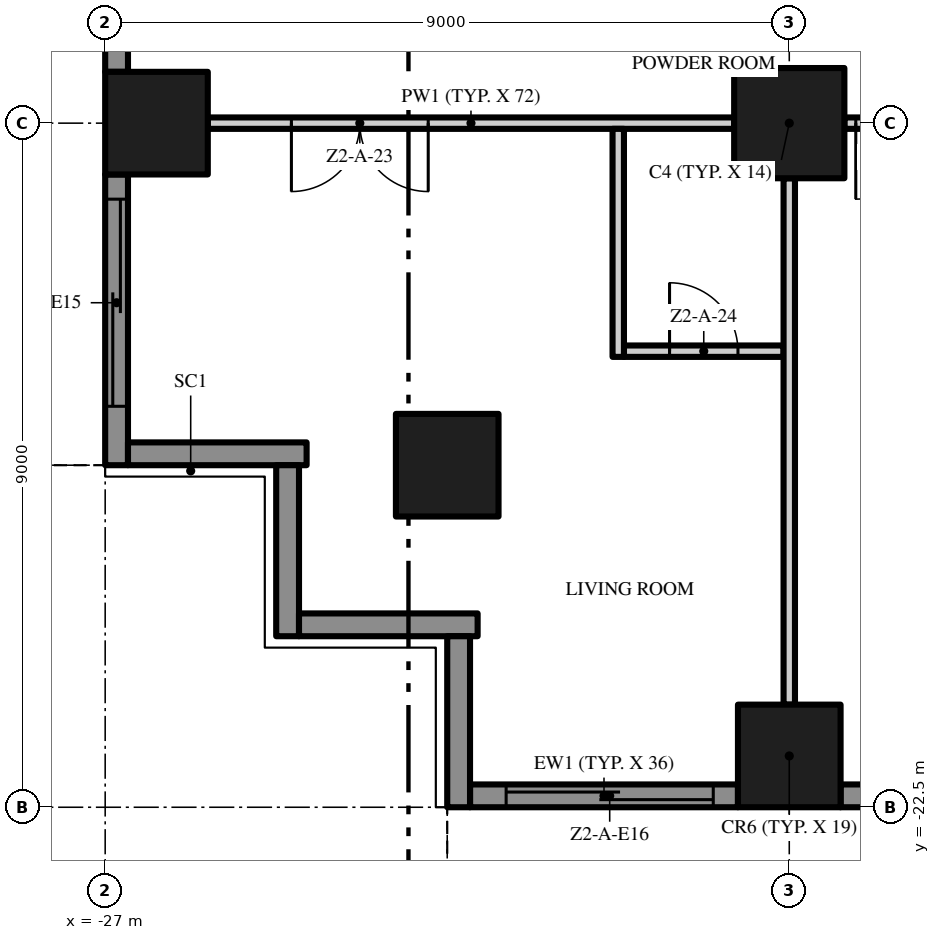
"""IFC4 building model, lengths in metres.
Left out: names, types, materials, properties, quantities, classifications, styles, units other than length and angle.
Written with IfcOpenShell. Run it as: python <this file> out.ifc"""

import sys

from ifc_helpers import new_model, si_unit, direction, frame, frame_2d, origin, origin_2d, place, context, subcontext, project, spatial, polyline, rectangle, outline, extrude, element, fill, save


model = new_model("IFC4")
c1 = context("Model", 3, precision=1e-05, world=origin(), true_north=direction((0.0, 1.0)))
c2 = subcontext(c1, "Body", "Model", "MODEL_VIEW")
j1 = project(units=[si_unit("LENGTHUNIT", "METRE"), si_unit("PLANEANGLEUNIT", "RADIAN")], contexts=[c1])
p1 = place(None, origin())
s1 = spatial("IfcSite", under=j1, at=p1, CompositionType="ELEMENT")
p2 = place(p1, origin())
s2 = spatial("IfcBuilding", under=s1, at=p2, CompositionType="ELEMENT")
p3 = place(p2, frame((0.0, 0.0, 77.0)))
s3 = spatial("IfcBuildingStorey", under=s2, at=p3, CompositionType="ELEMENT", Elevation=77.0)
p4 = place(p3, frame((-18.0, -13.5, 0.0), z_axis=(0.0, 0.0, 1.0), x_axis=(1.0, 0.0, 0.0)))
e1 = element("IfcColumn", 1, at=p4, inside=s3, PredefinedType="COLUMN", context=c2, shape_type="SweptSolid", body=[
    extrude(rectangle(XDim=1.45, YDim=1.45, at=origin_2d()), origin(), (0.0, 0.0, 1.0), 3.5),
])
for number, where, z_axis, x_axis in (
    (2, (-18.0, -21.825, 0.0), (0.0, 0.0, 1.0), (1.0, 0.0, 0.0)),
    (3, (-26.325, -13.5, 0.0), (0.0, 0.0, 1.0), (1.0, 0.0, 0.0)),
    (4, (-22.5, -18.0, 0.0), (0.0, 0.0, 1.0), (1.0, 0.0, 0.0)),
):
    element("IfcColumn", number, at=place(p3, frame(where, z_axis=z_axis, x_axis=x_axis)), inside=s3, PredefinedType="COLUMN", context=c2, shape_type="SweptSolid", body=[
        extrude(rectangle(XDim=1.35, YDim=1.35, at=origin_2d()), origin(), (0.0, 0.0, 1.0), 3.5),
    ])
p5 = place(p3, frame((-18.675, -22.35, 0.0), z_axis=(0.0, 0.0, 1.0), x_axis=(-1.0, 0.0, 0.0)))
e5 = element("IfcWall", 5, at=p5, inside=s3, PredefinedType="SOLIDWALL", context=c2, shape_type="SweptSolid", body=[
    extrude(rectangle(XDim=3.525, YDim=0.3, at=frame_2d((1.762, 0.0))), origin(), (0.0, 0.0, 1.0), 3.5),
])
p6 = place(p5, frame((0.325, 0.0, 0.0)))
e6 = element("IfcOpeningElement", 6, at=p6, cuts=e5, PredefinedType="OPENING", context=c2, shape_type="SweptSolid", body=[
    extrude(rectangle(XDim=2.725, YDim=2.4, at=frame_2d((1.363, 1.2))), frame((0.0, 0.16, 0.0), z_axis=(0.0, -1.0, 0.0), x_axis=(1.0, 0.0, 0.0)), (0.0, 0.0, 1.0), 0.32),
])
p7 = place(p3, frame((-9.675, -22.35, 0.0), z_axis=(0.0, 0.0, 1.0), x_axis=(-1.0, 0.0, 0.0)))
e7 = element("IfcWall", 7, at=p7, inside=s3, PredefinedType="SOLIDWALL", context=c2, shape_type="SweptSolid", body=[
    extrude(rectangle(XDim=7.65, YDim=0.3, at=frame_2d((3.825, 0.0))), origin(), (0.0, 0.0, 1.0), 3.5),
])
p8 = place(p7, frame((4.6, 0.0, 0.45)))
e8 = element("IfcOpeningElement", 8, at=p8, cuts=e7, PredefinedType="OPENING", context=c2, shape_type="SweptSolid", body=[
    extrude(rectangle(XDim=2.725, YDim=2.65, at=frame_2d((1.363, 1.325))), frame((0.0, 0.16, 0.0), z_axis=(0.0, -1.0, 0.0), x_axis=(1.0, 0.0, 0.0)), (0.0, 0.0, 1.0), 0.32),
])
p9 = place(p7, frame((0.325, 0.0, 0.45)))
e9 = element("IfcOpeningElement", 9, at=p9, cuts=e7, PredefinedType="OPENING", context=c2, shape_type="SweptSolid", body=[
    extrude(rectangle(XDim=2.725, YDim=2.65, at=frame_2d((1.363, 1.325))), frame((0.0, 0.16, 0.0), z_axis=(0.0, -1.0, 0.0), x_axis=(1.0, 0.0, 0.0)), (0.0, 0.0, 1.0), 0.32),
])
p10 = place(p3, frame((-26.85, -12.825, 0.0), z_axis=(0.0, 0.0, 1.0), x_axis=(0.0, 1.0, 0.0)))
e10 = element("IfcWall", 10, at=p10, inside=s3, PredefinedType="SOLIDWALL", context=c2, shape_type="SweptSolid", body=[
    extrude(rectangle(XDim=7.65, YDim=0.3, at=frame_2d((3.825, 0.0))), origin(), (0.0, 0.0, 1.0), 3.5),
])
p11 = place(p10, frame((4.6, 0.0, 0.45)))
e11 = element("IfcOpeningElement", 11, at=p11, cuts=e10, PredefinedType="OPENING", context=c2, shape_type="SweptSolid", body=[
    extrude(rectangle(XDim=2.725, YDim=2.65, at=frame_2d((1.363, 1.325))), frame((0.0, 0.16, 0.0), z_axis=(0.0, -1.0, 0.0), x_axis=(1.0, 0.0, 0.0)), (0.0, 0.0, 1.0), 0.32),
])
p12 = place(p10, frame((0.325, 0.0, 0.45)))
e12 = element("IfcOpeningElement", 12, at=p12, cuts=e10, PredefinedType="OPENING", context=c2, shape_type="SweptSolid", body=[
    extrude(rectangle(XDim=2.725, YDim=2.65, at=frame_2d((1.363, 1.325))), frame((0.0, 0.16, 0.0), z_axis=(0.0, -1.0, 0.0), x_axis=(1.0, 0.0, 0.0)), (0.0, 0.0, 1.0), 0.32),
])
p13 = place(p3, frame((-26.85, -18.0, 0.0), z_axis=(0.0, 0.0, 1.0), x_axis=(0.0, 1.0, 0.0)))
e13 = element("IfcWall", 13, at=p13, inside=s3, PredefinedType="SOLIDWALL", context=c2, shape_type="SweptSolid", body=[
    extrude(rectangle(XDim=3.825, YDim=0.3, at=frame_2d((1.913, 0.0))), origin(), (0.0, 0.0, 1.0), 3.5),
])
p14 = place(p13, frame((0.775, 0.0, 0.0)))
e14 = element("IfcOpeningElement", 14, at=p14, cuts=e13, PredefinedType="OPENING", context=c2, shape_type="SweptSolid", body=[
    extrude(rectangle(XDim=2.725, YDim=2.4, at=frame_2d((1.363, 1.2))), frame((0.0, 0.16, 0.0), z_axis=(0.0, -1.0, 0.0), x_axis=(1.0, 0.0, 0.0)), (0.0, 0.0, 1.0), 0.32),
])
p15 = place(p3, frame((-24.35, -17.85, 0.0), z_axis=(0.0, 0.0, 1.0), x_axis=(-1.0, 0.0, 0.0)))
e15 = element("IfcWall", 15, at=p15, inside=s3, PredefinedType="SOLIDWALL", context=c2, shape_type="SweptSolid", body=[
    extrude(rectangle(XDim=2.35, YDim=0.3, at=frame_2d((1.175, 0.0))), origin(), (0.0, 0.0, 1.0), 3.5),
])
p16 = place(p3, frame((-24.6, -20.25, 0.0), z_axis=(0.0, 0.0, 1.0), x_axis=(0.0, 1.0, 0.0)))
e16 = element("IfcWall", 16, at=p16, inside=s3, PredefinedType="SOLIDWALL", context=c2, shape_type="SweptSolid", body=[
    extrude(rectangle(XDim=2.25, YDim=0.3, at=frame_2d((1.125, 0.0))), origin(), (0.0, 0.0, 1.0), 3.5),
])
p17 = place(p3, frame((-22.1, -20.1, 0.0), z_axis=(0.0, 0.0, 1.0), x_axis=(-1.0, 0.0, 0.0)))
e17 = element("IfcWall", 17, at=p17, inside=s3, PredefinedType="SOLIDWALL", context=c2, shape_type="SweptSolid", body=[
    extrude(rectangle(XDim=2.35, YDim=0.3, at=frame_2d((1.175, 0.0))), origin(), (0.0, 0.0, 1.0), 3.5),
])
p18 = place(p3, frame((-22.35, -22.5, 0.0), z_axis=(0.0, 0.0, 1.0), x_axis=(0.0, 1.0, 0.0)))
e18 = element("IfcWall", 18, at=p18, inside=s3, PredefinedType="SOLIDWALL", context=c2, shape_type="SweptSolid", body=[
    extrude(rectangle(XDim=2.25, YDim=0.3, at=frame_2d((1.125, 0.0))), origin(), (0.0, 0.0, 1.0), 3.5),
])
p19 = place(p3, origin())
e19 = element("IfcWall", 19, at=p19, inside=s3, PredefinedType="USERDEFINED", context=c2, shape_type="SweptSolid", body=[
    extrude(outline(polyline([(-22.5, -24.3), (-21.0, -25.005), (-19.5, -25.441), (-18.75, -25.5), (-18.0, -25.441), (-16.5, -25.005), (-15.0, -24.3), (-13.5, -23.595), (-12.0, -23.159), (-11.25, -23.1), (-10.5, -23.159), (-9.0, -23.595), (-7.5, -24.3), (-6.0, -25.005), (-4.5, -25.441), (-3.75, -25.5), (-3.0, -25.441), (-1.5, -25.005), (0.0, -24.3), (1.5, -23.595), (3.0, -23.159), (3.75, -23.1), (4.5, -23.159), (6.0, -23.595), (7.5, -24.3), (9.0, -25.005), (10.5, -25.441), (11.25, -25.5), (12.0, -25.441), (13.5, -25.005), (15.0, -24.3), (16.5, -23.595), (18.0, -23.159), (18.75, -23.1), (19.5, -23.159), (21.0, -23.595), (22.5, -24.3), (22.606, -24.074), (21.089, -23.36), (19.545, -22.911), (18.75, -22.849), (17.955, -22.911), (16.411, -23.36), (14.894, -24.074), (13.411, -24.771), (11.955, -25.194), (11.25, -25.249), (10.545, -25.194), (9.089, -24.771), (7.606, -24.074), (6.089, -23.36), (4.545, -22.911), (3.75, -22.849), (2.955, -22.911), (1.411, -23.36), (-0.106, -24.074), (-1.589, -24.771), (-3.045, -25.194), (-3.75, -25.249), (-4.455, -25.194), (-5.911, -24.771), (-7.394, -24.074), (-8.911, -23.36), (-10.455, -22.911), (-11.25, -22.849), (-12.045, -22.911), (-13.589, -23.36), (-15.106, -24.074), (-16.589, -24.771), (-18.045, -25.194), (-18.75, -25.249), (-19.455, -25.194), (-20.911, -24.771), (-22.394, -24.074), (-22.5, -24.3)])), origin(), (0.0, 0.0, 1.0), 0.9),
])
p20 = place(p3, origin())
e20 = element("IfcWall", 20, at=p20, inside=s3, PredefinedType="USERDEFINED", context=c2, shape_type="SweptSolid", body=[
    extrude(outline(polyline([(-28.8, 18.0), (-29.505, 16.5), (-29.941, 15.0), (-30.0, 14.25), (-29.941, 13.5), (-29.505, 12.0), (-28.8, 10.5), (-28.095, 9.0), (-27.659, 7.5), (-27.6, 6.75), (-27.659, 6.0), (-28.095, 4.5), (-28.8, 3.0), (-29.505, 1.5), (-29.941, 0.0), (-30.0, -0.75), (-29.941, -1.5), (-29.505, -3.0), (-28.8, -4.5), (-28.095, -6.0), (-27.659, -7.5), (-27.6, -8.25), (-27.659, -9.0), (-28.095, -10.5), (-28.8, -12.0), (-29.505, -13.5), (-29.941, -15.0), (-30.0, -15.75), (-29.941, -16.5), (-29.505, -18.0), (-29.265, -17.93), (-29.694, -16.455), (-29.749, -15.75), (-29.694, -15.045), (-29.271, -13.589), (-28.574, -12.106), (-27.86, -10.589), (-27.411, -9.045), (-27.349, -8.25), (-27.411, -7.455), (-27.86, -5.911), (-28.574, -4.394), (-29.271, -2.911), (-29.694, -1.455), (-29.749, -0.75), (-29.694, -0.045), (-29.271, 1.411), (-28.574, 2.894), (-27.86, 4.411), (-27.411, 5.955), (-27.349, 6.75), (-27.411, 7.545), (-27.86, 9.089), (-28.574, 10.606), (-29.271, 12.089), (-29.694, 13.545), (-29.749, 14.25), (-29.694, 14.955), (-29.271, 16.411), (-28.574, 17.894), (-28.8, 18.0)])), origin(), (0.0, 0.0, 1.0), 0.9),
])
p21 = place(p3, frame((-20.175, -16.5, 0.0), z_axis=(0.0, 0.0, 1.0), x_axis=(1.0, 0.0, 0.0)))
e21 = element("IfcWall", 21, at=p21, inside=s3, PredefinedType="PARTITIONING", context=c2, shape_type="SweptSolid", body=[
    extrude(rectangle(XDim=2.1, YDim=0.15, at=frame_2d((1.05, 0.0))), origin(), (0.0, 0.0, 1.0), 3.5),
])
p22 = place(p21, frame((0.6, 0.0, 0.0)))
e22 = element("IfcOpeningElement", 22, at=p22, cuts=e21, PredefinedType="OPENING", context=c2, shape_type="SweptSolid", body=[
    extrude(rectangle(XDim=0.9, YDim=2.1, at=frame_2d((0.45, 1.05))), frame((0.0, 0.085, 0.0), z_axis=(0.0, -1.0, 0.0), x_axis=(1.0, 0.0, 0.0)), (0.0, 0.0, 1.0), 0.17),
])
p23 = place(p3, frame((-18.725, -13.5, 0.0), z_axis=(0.0, 0.0, 1.0), x_axis=(-1.0, 0.0, 0.0)))
e23 = element("IfcWall", 23, at=p23, inside=s3, PredefinedType="PARTITIONING", context=c2, shape_type="SweptSolid", body=[
    extrude(rectangle(XDim=6.925, YDim=0.15, at=frame_2d((3.462, 0.0))), origin(), (0.0, 0.0, 1.0), 3.5),
])
p24 = place(p23, frame((4.025, 0.0, 0.0)))
e24 = element("IfcOpeningElement", 24, at=p24, cuts=e23, PredefinedType="OPENING", context=c2, shape_type="SweptSolid", body=[
    extrude(rectangle(XDim=1.8, YDim=2.4, at=frame_2d((0.9, 1.2))), frame((0.0, 0.085, 0.0), z_axis=(0.0, -1.0, 0.0), x_axis=(1.0, 0.0, 0.0)), (0.0, 0.0, 1.0), 0.17),
])
p25 = place(p3, frame((-9.725, -13.5, 0.0), z_axis=(0.0, 0.0, 1.0), x_axis=(-1.0, 0.0, 0.0)))
e25 = element("IfcWall", 25, at=p25, inside=s3, PredefinedType="PARTITIONING", context=c2, shape_type="SweptSolid", body=[
    extrude(rectangle(XDim=7.55, YDim=0.15, at=frame_2d((3.775, 0.0))), origin(), (0.0, 0.0, 1.0), 3.5),
])
p26 = place(p25, frame((6.4, 0.0, 0.0)))
e26 = element("IfcOpeningElement", 26, at=p26, cuts=e25, PredefinedType="OPENING", context=c2, shape_type="SweptSolid", body=[
    extrude(rectangle(XDim=1.0, YDim=2.4, at=frame_2d((0.5, 1.2))), frame((0.0, 0.085, 0.0), z_axis=(0.0, -1.0, 0.0), x_axis=(1.0, 0.0, 0.0)), (0.0, 0.0, 1.0), 0.17),
])
p27 = place(p25, frame((0.15, 0.0, 0.0)))
e27 = element("IfcOpeningElement", 27, at=p27, cuts=e25, PredefinedType="OPENING", context=c2, shape_type="SweptSolid", body=[
    extrude(rectangle(XDim=1.0, YDim=2.4, at=frame_2d((0.5, 1.2))), frame((0.0, 0.085, 0.0), z_axis=(0.0, -1.0, 0.0), x_axis=(1.0, 0.0, 0.0)), (0.0, 0.0, 1.0), 0.17),
])
p28 = place(p3, frame((-20.25, -16.575, 0.0), z_axis=(0.0, 0.0, 1.0), x_axis=(0.0, 1.0, 0.0)))
e28 = element("IfcWall", 28, at=p28, inside=s3, PredefinedType="PARTITIONING", context=c2, shape_type="SweptSolid", body=[
    extrude(rectangle(XDim=3.0, YDim=0.15, at=frame_2d((1.5, 0.0))), origin(), (0.0, 0.0, 1.0), 3.5),
])
p29 = place(p3, frame((-18.0, -21.15, 0.0), z_axis=(0.0, 0.0, 1.0), x_axis=(0.0, 1.0, 0.0)))
e29 = element("IfcWall", 29, at=p29, inside=s3, PredefinedType="PARTITIONING", context=c2, shape_type="SweptSolid", body=[
    extrude(rectangle(XDim=6.925, YDim=0.15, at=frame_2d((3.462, 0.0))), origin(), (0.0, 0.0, 1.0), 3.5),
])
p30 = place(p6, origin())
e30 = element("IfcDoor", 30, at=p30, inside=s3, OperationType="SINGLE_SWING_LEFT", PredefinedType="DOOR", context=c2, shape_type="SweptSolid", body=[
    extrude(rectangle(XDim=2.725, YDim=2.4, at=frame_2d((1.363, 1.2))), frame((0.0, 0.025, 0.0), z_axis=(0.0, -1.0, 0.0), x_axis=(1.0, 0.0, 0.0)), (0.0, 0.0, 1.0), 0.05),
])
fill(e6, e30)
p31 = place(p14, origin())
e31 = element("IfcDoor", 31, at=p31, inside=s3, OperationType="SINGLE_SWING_LEFT", PredefinedType="DOOR", context=c2, shape_type="SweptSolid", body=[
    extrude(rectangle(XDim=2.725, YDim=2.4, at=frame_2d((1.363, 1.2))), frame((0.0, 0.025, 0.0), z_axis=(0.0, -1.0, 0.0), x_axis=(1.0, 0.0, 0.0)), (0.0, 0.0, 1.0), 0.05),
])
fill(e14, e31)
p32 = place(p24, origin())
e32 = element("IfcDoor", 32, at=p32, inside=s3, OperationType="DOUBLE_DOOR_SINGLE_SWING", PredefinedType="DOOR", context=c2, shape_type="SweptSolid", body=[
    extrude(rectangle(XDim=1.8, YDim=2.4, at=frame_2d((0.9, 1.2))), frame((0.0, 0.025, 0.0), z_axis=(0.0, -1.0, 0.0), x_axis=(1.0, 0.0, 0.0)), (0.0, 0.0, 1.0), 0.05),
])
fill(e24, e32)
p33 = place(p22, origin())
e33 = element("IfcDoor", 33, at=p33, inside=s3, OperationType="SINGLE_SWING_LEFT", PredefinedType="DOOR", context=c2, shape_type="SweptSolid", body=[
    extrude(rectangle(XDim=0.9, YDim=2.1, at=frame_2d((0.45, 1.05))), frame((0.0, 0.025, 0.0), z_axis=(0.0, -1.0, 0.0), x_axis=(1.0, 0.0, 0.0)), (0.0, 0.0, 1.0), 0.05),
])
fill(e22, e33)
p34 = place(p26, origin())
e34 = element("IfcDoor", 34, at=p34, inside=s3, OperationType="SINGLE_SWING_RIGHT", PredefinedType="DOOR", context=c2, shape_type="SweptSolid", body=[
    extrude(rectangle(XDim=1.0, YDim=2.4, at=frame_2d((0.5, 1.2))), frame((0.0, 0.025, 0.0), z_axis=(0.0, -1.0, 0.0), x_axis=(1.0, 0.0, 0.0)), (0.0, 0.0, 1.0), 0.05),
])
fill(e26, e34)
save(model, sys.argv[1])
